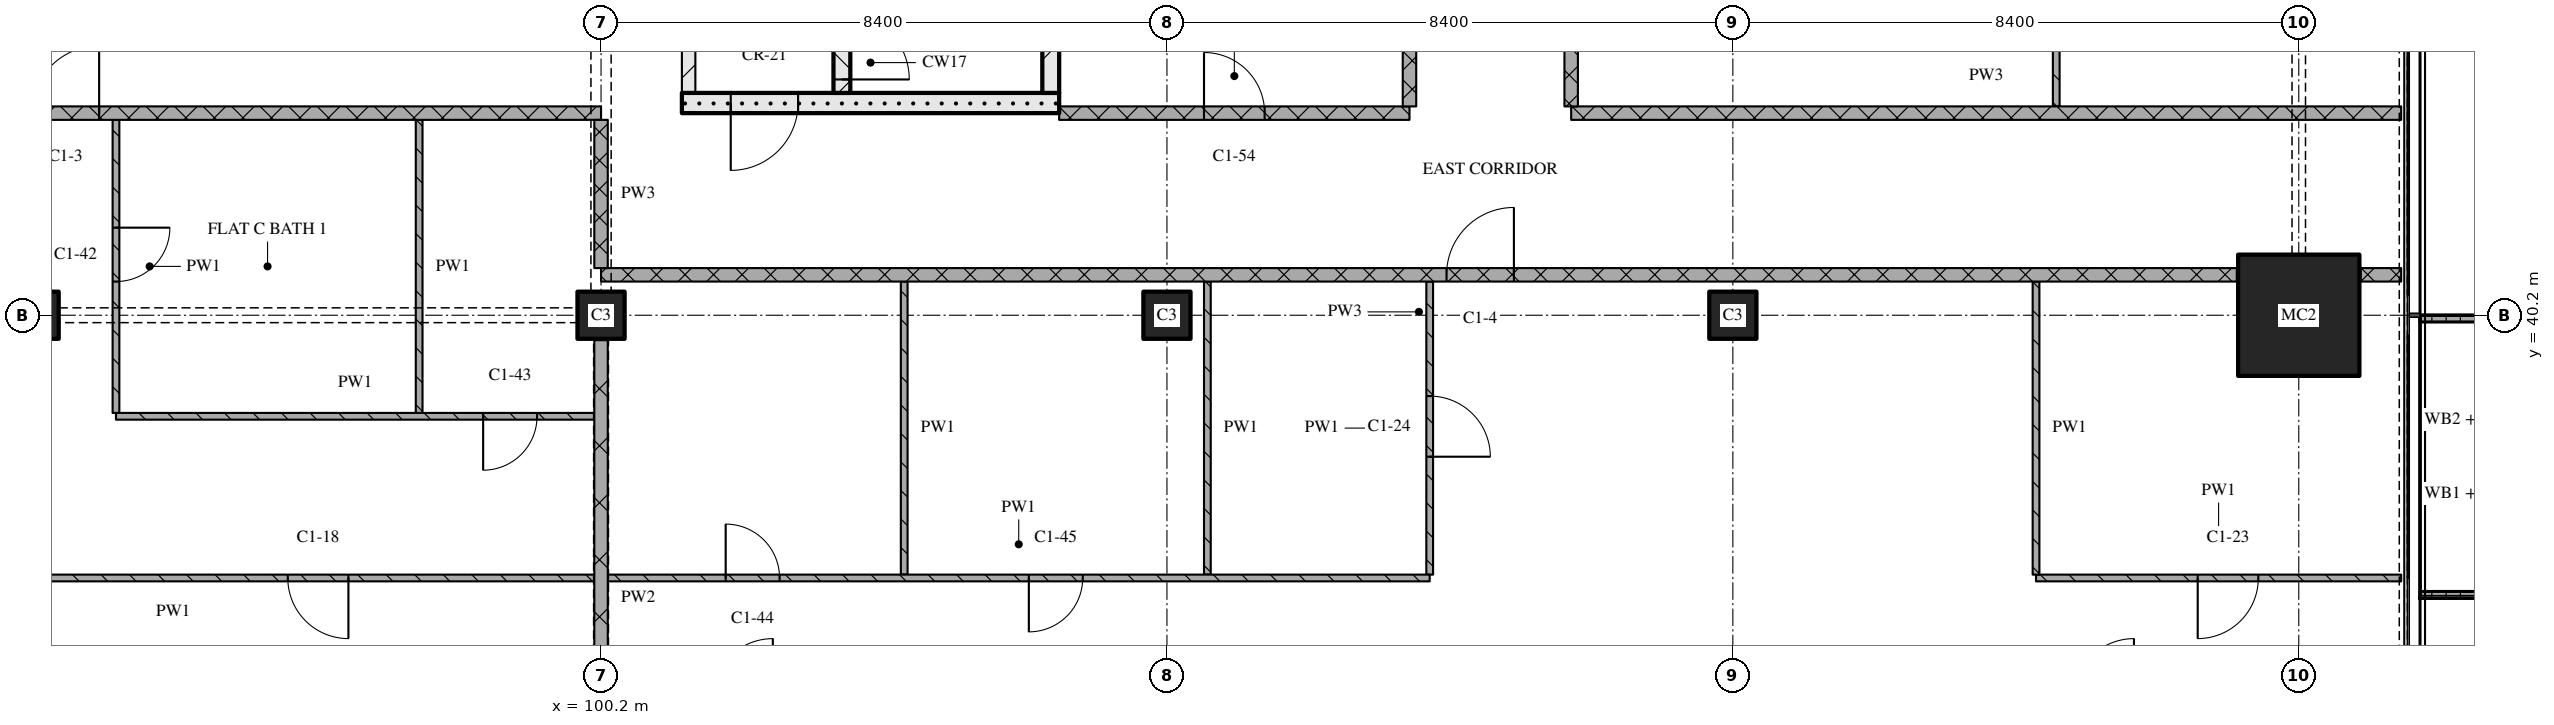
"""IFC4 building model, lengths in metres.
Left out: names, types, materials, properties, quantities, classifications, styles, units other than length and angle.
Written with IfcOpenShell. Run it as: python <this file> out.ifc"""

import sys

from ifc_helpers import new_model, si_unit, direction, frame, frame_2d, origin, origin_2d, place, context, subcontext, project, spatial, polyline, rectangle, outline, extrude, element, fill, save


model = new_model("IFC4")
c1 = context("Model", 3, precision=1e-05, world=origin(), true_north=direction((0.0, 1.0)))
c2 = subcontext(c1, "Body", "Model", "MODEL_VIEW")
j1 = project(units=[si_unit("LENGTHUNIT", "METRE"), si_unit("PLANEANGLEUNIT", "RADIAN")], contexts=[c1])
p1 = place(None, origin())
s1 = spatial("IfcSite", under=j1, at=p1, CompositionType="ELEMENT")
p2 = place(p1, origin())
s2 = spatial("IfcBuilding", under=s1, at=p2, CompositionType="ELEMENT")
p3 = place(p2, frame((0.0, 0.0, 154.65)))
s3 = spatial("IfcBuildingStorey", under=s2, at=p3, CompositionType="ELEMENT", Elevation=154.65)
for number, where, z_axis, x_axis in (
    (1, (91.8, 40.2, 0.0), (0.0, 0.0, 1.0), (1.0, 0.0, 0.0)),
    (2, (100.2, 40.2, 0.0), (0.0, 0.0, 1.0), (1.0, 0.0, 0.0)),
    (3, (108.6, 40.2, 0.0), (0.0, 0.0, 1.0), (1.0, 0.0, 0.0)),
    (4, (117.0, 40.2, 0.0), (0.0, 0.0, 1.0), (1.0, 0.0, 0.0)),
):
    element("IfcColumn", number, at=place(p3, frame(where, z_axis=z_axis, x_axis=x_axis)), inside=s3, PredefinedType="COLUMN", context=c2, shape_type="SweptSolid", body=[
        extrude(rectangle(XDim=0.7, YDim=0.7, at=origin_2d()), origin(), (0.0, 0.0, 1.0), 3.6),
    ])
p4 = place(p3, frame((125.4, 40.2, 0.0), z_axis=(0.0, 0.0, 1.0), x_axis=(1.0, 0.0, 0.0)))
e5 = element("IfcColumn", 5, at=p4, inside=s3, PredefinedType="COLUMN", context=c2, shape_type="SweptSolid", body=[
    extrude(rectangle(XDim=1.8, YDim=1.8, at=origin_2d()), origin(), (0.0, 0.0, 1.0), 3.6),
])
p5 = place(p3, origin())
e6 = element("IfcWall", 6, at=p5, inside=s3, PredefinedType="SOLIDWALL", context=c2, shape_type="SweptSolid", body=[
    extrude(outline(polyline([(127.2, 36.0), (127.2, 36.1), (128.833, 36.1), (128.833, 40.1), (127.2, 40.1), (127.2, 40.2), (128.933, 40.2), (128.933, 36.0), (127.2, 36.0)])), origin(), (0.0, 0.0, 1.0), 1.0),
])
p6 = place(p3, frame((101.4, 43.35, 0.0), z_axis=(0.0, 0.0, 1.0), x_axis=(1.0, 0.0, 0.0)))
e7 = element("IfcWall", 7, at=p6, inside=s3, PredefinedType="SOLIDWALL", context=c2, shape_type="SweptSolid", body=[
    extrude(rectangle(XDim=5.6, YDim=0.3, at=frame_2d((2.8, 0.0))), origin(), (0.0, 0.0, 1.0), 3.32),
])
p7 = place(p6, frame((0.725, 0.0, 0.0)))
e8 = element("IfcOpeningElement", 8, at=p7, cuts=e7, PredefinedType="OPENING", context=c2, shape_type="SweptSolid", body=[
    extrude(rectangle(XDim=1.0, YDim=2.1, at=frame_2d((0.5, 1.05))), frame((0.0, 0.16, 0.0), z_axis=(0.0, -1.0, 0.0), x_axis=(1.0, 0.0, 0.0)), (0.0, 0.0, 1.0), 0.32),
])
p8 = place(p3, frame((101.5, 43.5, 0.0), z_axis=(0.0, 0.0, 1.0), x_axis=(0.0, 1.0, 0.0)))
e9 = element("IfcWall", 9, at=p8, inside=s3, PredefinedType="PARTITIONING", context=c2, shape_type="SweptSolid", body=[
    extrude(rectangle(XDim=6.9, YDim=0.2, at=frame_2d((3.45, 0.0))), origin(), (0.0, 0.0, 1.0), 3.32),
])
p9 = place(p8, frame((1.0, 0.0, 0.0)))
e10 = element("IfcOpeningElement", 10, at=p9, cuts=e9, PredefinedType="OPENING", context=c2, shape_type="SweptSolid", body=[
    extrude(rectangle(XDim=1.0, YDim=2.1, at=frame_2d((0.5, 1.05))), frame((0.0, 0.11, 0.0), z_axis=(0.0, -1.0, 0.0), x_axis=(1.0, 0.0, 0.0)), (0.0, 0.0, 1.0), 0.22),
])
p10 = place(p3, frame((103.775, 43.5, 0.0), z_axis=(0.0, 0.0, 1.0), x_axis=(0.0, 1.0, 0.0)))
e11 = element("IfcWall", 11, at=p10, inside=s3, PredefinedType="SOLIDWALL", context=c2, shape_type="SweptSolid", body=[
    extrude(rectangle(XDim=6.9, YDim=0.25, at=frame_2d((3.45, 0.0))), origin(), (0.0, 0.0, 1.0), 3.32),
])
p11 = place(p10, frame((0.2, 0.0, 0.0)))
e12 = element("IfcOpeningElement", 12, at=p11, cuts=e11, PredefinedType="OPENING", context=c2, shape_type="SweptSolid", body=[
    extrude(rectangle(XDim=1.0, YDim=2.1, at=frame_2d((0.5, 1.05))), frame((0.0, 0.135, 0.0), z_axis=(0.0, -1.0, 0.0), x_axis=(1.0, 0.0, 0.0)), (0.0, 0.0, 1.0), 0.27),
])
p12 = place(p3, frame((106.875, 43.5, 0.0), z_axis=(0.0, 0.0, 1.0), x_axis=(0.0, 1.0, 0.0)))
e13 = element("IfcWall", 13, at=p12, inside=s3, PredefinedType="SOLIDWALL", context=c2, shape_type="SweptSolid", body=[
    extrude(rectangle(XDim=6.9, YDim=0.25, at=frame_2d((3.45, 0.0))), origin(), (0.0, 0.0, 1.0), 3.32),
])
p13 = place(p3, frame((121.5, 36.3, 0.0), z_axis=(0.0, 0.0, 1.0), x_axis=(1.0, 0.0, 0.0)))
e14 = element("IfcWall", 14, at=p13, inside=s3, PredefinedType="PARTITIONING", context=c2, shape_type="SweptSolid", body=[
    extrude(rectangle(XDim=5.42, YDim=0.1, at=frame_2d((2.71, 0.0))), origin(), (0.0, 0.0, 1.0), 3.32),
])
p14 = place(p13, frame((2.4, 0.0, 0.0)))
e15 = element("IfcOpeningElement", 15, at=p14, cuts=e14, PredefinedType="OPENING", context=c2, shape_type="SweptSolid", body=[
    extrude(rectangle(XDim=0.9, YDim=2.1, at=frame_2d((0.45, 1.05))), frame((0.0, 0.06, 0.0), z_axis=(0.0, -1.0, 0.0), x_axis=(1.0, 0.0, 0.0)), (0.0, 0.0, 1.0), 0.12),
])
p15 = place(p3, frame((93.0, 38.7, 0.0), z_axis=(0.0, 0.0, 1.0), x_axis=(1.0, 0.0, 0.0)))
e16 = element("IfcWall", 16, at=p15, inside=s3, PredefinedType="PARTITIONING", context=c2, shape_type="SweptSolid", body=[
    extrude(rectangle(XDim=7.1, YDim=0.1, at=frame_2d((3.55, 0.0))), origin(), (0.0, 0.0, 1.0), 3.32),
])
p16 = place(p15, frame((5.45, 0.0, 0.0)))
e17 = element("IfcOpeningElement", 17, at=p16, cuts=e16, PredefinedType="OPENING", context=c2, shape_type="SweptSolid", body=[
    extrude(rectangle(XDim=0.8, YDim=2.1, at=frame_2d((0.4, 1.05))), frame((0.0, 0.06, 0.0), z_axis=(0.0, -1.0, 0.0), x_axis=(1.0, 0.0, 0.0)), (0.0, 0.0, 1.0), 0.12),
])
p17 = place(p3, frame((124.48, 40.8, 0.0), z_axis=(0.0, 0.0, 1.0), x_axis=(-1.0, 0.0, 0.0)))
e18 = element("IfcWall", 18, at=p17, inside=s3, PredefinedType="PARTITIONING", context=c2, shape_type="SweptSolid", body=[
    extrude(rectangle(XDim=24.28, YDim=0.2, at=frame_2d((12.14, 0.0))), origin(), (0.0, 0.0, 1.0), 3.32),
])
p18 = place(p17, frame((10.73, 0.0, 0.0)))
e19 = element("IfcOpeningElement", 19, at=p18, cuts=e18, PredefinedType="OPENING", context=c2, shape_type="SweptSolid", body=[
    extrude(rectangle(XDim=1.0, YDim=2.1, at=frame_2d((0.5, 1.05))), frame((0.0, 0.11, 0.0), z_axis=(0.0, -1.0, 0.0), x_axis=(1.0, 0.0, 0.0)), (0.0, 0.0, 1.0), 0.22),
])
p19 = place(p3, frame((126.32, 40.8, 0.0), z_axis=(0.0, 0.0, 1.0), x_axis=(1.0, 0.0, 0.0)))
e20 = element("IfcWall", 20, at=p19, inside=s3, PredefinedType="PARTITIONING", context=c2, shape_type="SweptSolid", body=[
    extrude(rectangle(XDim=0.6, YDim=0.2, at=frame_2d((0.3, 0.0))), origin(), (0.0, 0.0, 1.0), 3.32),
])
p20 = place(p3, frame((100.2, 43.2, 0.0), z_axis=(0.0, 0.0, 1.0), x_axis=(-1.0, 0.0, 0.0)))
e21 = element("IfcWall", 21, at=p20, inside=s3, PredefinedType="PARTITIONING", context=c2, shape_type="SweptSolid", body=[
    extrude(rectangle(XDim=25.2, YDim=0.2, at=frame_2d((12.6, 0.0))), origin(), (0.0, 0.0, 1.0), 3.32),
])
p21 = place(p20, frame((7.45, 0.0, 0.0)))
e22 = element("IfcOpeningElement", 22, at=p21, cuts=e21, PredefinedType="OPENING", context=c2, shape_type="SweptSolid", body=[
    extrude(rectangle(XDim=1.0, YDim=2.1, at=frame_2d((0.5, 1.05))), frame((0.0, 0.11, 0.0), z_axis=(0.0, -1.0, 0.0), x_axis=(1.0, 0.0, 0.0)), (0.0, 0.0, 1.0), 0.22),
])
p22 = place(p20, frame((20.95, 0.0, 0.0)))
e23 = element("IfcOpeningElement", 23, at=p22, cuts=e21, PredefinedType="OPENING", context=c2, shape_type="SweptSolid", body=[
    extrude(rectangle(XDim=1.0, YDim=2.1, at=frame_2d((0.5, 1.05))), frame((0.0, 0.11, 0.0), z_axis=(0.0, -1.0, 0.0), x_axis=(1.0, 0.0, 0.0)), (0.0, 0.0, 1.0), 0.22),
])
p23 = place(p3, frame((107.0, 43.2, 0.0), z_axis=(0.0, 0.0, 1.0), x_axis=(1.0, 0.0, 0.0)))
e24 = element("IfcWall", 24, at=p23, inside=s3, PredefinedType="PARTITIONING", context=c2, shape_type="SweptSolid", body=[
    extrude(rectangle(XDim=5.2, YDim=0.2, at=frame_2d((2.6, 0.0))), origin(), (0.0, 0.0, 1.0), 3.32),
])
p24 = place(p23, frame((2.15, 0.0, 0.0)))
e25 = element("IfcOpeningElement", 25, at=p24, cuts=e24, PredefinedType="OPENING", context=c2, shape_type="SweptSolid", body=[
    extrude(rectangle(XDim=0.9, YDim=2.1, at=frame_2d((0.45, 1.05))), frame((0.0, 0.11, 0.0), z_axis=(0.0, -1.0, 0.0), x_axis=(1.0, 0.0, 0.0)), (0.0, 0.0, 1.0), 0.22),
])
p25 = place(p3, frame((114.6, 43.2, 0.0), z_axis=(0.0, 0.0, 1.0), x_axis=(1.0, 0.0, 0.0)))
e26 = element("IfcWall", 26, at=p25, inside=s3, PredefinedType="PARTITIONING", context=c2, shape_type="SweptSolid", body=[
    extrude(rectangle(XDim=12.32, YDim=0.2, at=frame_2d((6.16, 0.0))), origin(), (0.0, 0.0, 1.0), 3.32),
])
p26 = place(p3, frame((93.0, 43.1, 0.0), z_axis=(0.0, 0.0, 1.0), x_axis=(0.0, -1.0, 0.0)))
e27 = element("IfcWall", 27, at=p26, inside=s3, PredefinedType="PARTITIONING", context=c2, shape_type="SweptSolid", body=[
    extrude(rectangle(XDim=4.35, YDim=0.1, at=frame_2d((2.175, 0.0))), origin(), (0.0, 0.0, 1.0), 3.32),
])
p27 = place(p26, frame((1.6, 0.0, 0.0)))
e28 = element("IfcOpeningElement", 28, at=p27, cuts=e27, PredefinedType="OPENING", context=c2, shape_type="SweptSolid", body=[
    extrude(rectangle(XDim=0.8, YDim=2.1, at=frame_2d((0.4, 1.05))), frame((0.0, 0.06, 0.0), z_axis=(0.0, -1.0, 0.0), x_axis=(1.0, 0.0, 0.0)), (0.0, 0.0, 1.0), 0.12),
])
p28 = place(p3, frame((97.5, 43.1, 0.0), z_axis=(0.0, 0.0, 1.0), x_axis=(0.0, -1.0, 0.0)))
e29 = element("IfcWall", 29, at=p28, inside=s3, PredefinedType="PARTITIONING", context=c2, shape_type="SweptSolid", body=[
    extrude(rectangle(XDim=4.35, YDim=0.1, at=frame_2d((2.175, 0.0))), origin(), (0.0, 0.0, 1.0), 3.32),
])
p29 = place(p3, frame((100.2, 43.1, 0.0), z_axis=(0.0, 0.0, 1.0), x_axis=(0.0, -1.0, 0.0)))
e30 = element("IfcWall", 30, at=p29, inside=s3, PredefinedType="PARTITIONING", context=c2, shape_type="SweptSolid", body=[
    extrude(rectangle(XDim=2.2, YDim=0.2, at=frame_2d((1.1, 0.0))), origin(), (0.0, 0.0, 1.0), 2.43),
])
p30 = place(p3, frame((100.2, 39.83, 0.0), z_axis=(0.0, 0.0, 1.0), x_axis=(0.0, -1.0, 0.0)))
e31 = element("IfcWall", 31, at=p30, inside=s3, PredefinedType="PARTITIONING", context=c2, shape_type="SweptSolid", body=[
    extrude(rectangle(XDim=7.66, YDim=0.2, at=frame_2d((3.83, 0.0))), origin(), (0.0, 0.0, 1.0), 2.72),
])
for number, where, z_axis, x_axis in (
    (32, (104.7, 40.7, 0.0), (0.0, 0.0, 1.0), (0.0, -1.0, 0.0)),
    (33, (109.2, 40.7, 0.0), (0.0, 0.0, 1.0), (0.0, -1.0, 0.0)),
):
    element("IfcWall", number, at=place(p3, frame(where, z_axis=z_axis, x_axis=x_axis)), inside=s3, PredefinedType="PARTITIONING", context=c2, shape_type="SweptSolid", body=[
        extrude(rectangle(XDim=4.35, YDim=0.1, at=frame_2d((2.175, 0.0))), origin(), (0.0, 0.0, 1.0), 3.32),
    ])
p31 = place(p3, frame((112.2, 43.3, 0.0), z_axis=(0.0, 0.0, 1.0), x_axis=(0.0, 1.0, 0.0)))
e34 = element("IfcWall", 34, at=p31, inside=s3, PredefinedType="PARTITIONING", context=c2, shape_type="SweptSolid", body=[
    extrude(rectangle(XDim=15.4, YDim=0.2, at=frame_2d((7.7, 0.0))), origin(), (0.0, 0.0, 1.0), 3.32),
])
p32 = place(p31, frame((11.85, 0.0, 0.0)))
e35 = element("IfcOpeningElement", 35, at=p32, cuts=e34, PredefinedType="OPENING", context=c2, shape_type="SweptSolid", body=[
    extrude(rectangle(XDim=1.0, YDim=2.1, at=frame_2d((0.5, 1.05))), frame((0.0, 0.11, 0.0), z_axis=(0.0, -1.0, 0.0), x_axis=(1.0, 0.0, 0.0)), (0.0, 0.0, 1.0), 0.22),
])
p33 = place(p3, frame((112.5, 36.35, 0.0), z_axis=(0.0, 0.0, 1.0), x_axis=(0.0, 1.0, 0.0)))
e36 = element("IfcWall", 36, at=p33, inside=s3, PredefinedType="PARTITIONING", context=c2, shape_type="SweptSolid", body=[
    extrude(rectangle(XDim=4.35, YDim=0.1, at=frame_2d((2.175, 0.0))), origin(), (0.0, 0.0, 1.0), 3.32),
])
p34 = place(p33, frame((1.75, 0.0, 0.0)))
e37 = element("IfcOpeningElement", 37, at=p34, cuts=e36, PredefinedType="OPENING", context=c2, shape_type="SweptSolid", body=[
    extrude(rectangle(XDim=0.9, YDim=2.1, at=frame_2d((0.45, 1.05))), frame((0.0, 0.06, 0.0), z_axis=(0.0, -1.0, 0.0), x_axis=(1.0, 0.0, 0.0)), (0.0, 0.0, 1.0), 0.12),
])
p35 = place(p3, frame((114.6, 61.1, 0.0), z_axis=(0.0, 0.0, 1.0), x_axis=(0.0, -1.0, 0.0)))
e38 = element("IfcWall", 38, at=p35, inside=s3, PredefinedType="PARTITIONING", context=c2, shape_type="SweptSolid", body=[
    extrude(rectangle(XDim=17.8, YDim=0.2, at=frame_2d((8.9, 0.0))), origin(), (0.0, 0.0, 1.0), 3.32),
])
p36 = place(p35, frame((4.65, 0.0, 0.0)))
e39 = element("IfcOpeningElement", 39, at=p36, cuts=e38, PredefinedType="OPENING", context=c2, shape_type="SweptSolid", body=[
    extrude(rectangle(XDim=1.0, YDim=2.1, at=frame_2d((0.5, 1.05))), frame((0.0, 0.11, 0.0), z_axis=(0.0, -1.0, 0.0), x_axis=(1.0, 0.0, 0.0)), (0.0, 0.0, 1.0), 0.22),
])
p37 = place(p3, frame((121.5, 40.7, 0.0), z_axis=(0.0, 0.0, 1.0), x_axis=(0.0, -1.0, 0.0)))
e40 = element("IfcWall", 40, at=p37, inside=s3, PredefinedType="PARTITIONING", context=c2, shape_type="SweptSolid", body=[
    extrude(rectangle(XDim=4.35, YDim=0.1, at=frame_2d((2.175, 0.0))), origin(), (0.0, 0.0, 1.0), 3.32),
])
p38 = place(p3, frame((121.8, 48.55, 0.0), z_axis=(0.0, 0.0, 1.0), x_axis=(0.0, -1.0, 0.0)))
e41 = element("IfcWall", 41, at=p38, inside=s3, PredefinedType="PARTITIONING", context=c2, shape_type="SweptSolid", body=[
    extrude(rectangle(XDim=5.25, YDim=0.1, at=frame_2d((2.625, 0.0))), origin(), (0.0, 0.0, 1.0), 3.32),
])
p39 = place(p3, frame((100.1, 36.3, 0.0), z_axis=(0.0, 0.0, 1.0), x_axis=(-1.0, 0.0, 0.0)))
e42 = element("IfcWall", 42, at=p39, inside=s3, PredefinedType="PARTITIONING", context=c2, shape_type="SweptSolid", body=[
    extrude(rectangle(XDim=12.5, YDim=0.1, at=frame_2d((6.25, 0.0))), origin(), (0.0, 0.0, 1.0), 3.32),
])
p40 = place(p39, frame((3.65, 0.0, 0.0)))
e43 = element("IfcOpeningElement", 43, at=p40, cuts=e42, PredefinedType="OPENING", context=c2, shape_type="SweptSolid", body=[
    extrude(rectangle(XDim=0.9, YDim=2.1, at=frame_2d((0.45, 1.05))), frame((0.0, 0.06, 0.0), z_axis=(0.0, -1.0, 0.0), x_axis=(1.0, 0.0, 0.0)), (0.0, 0.0, 1.0), 0.12),
])
p41 = place(p39, frame((9.95, 0.0, 0.0)))
e44 = element("IfcOpeningElement", 44, at=p41, cuts=e42, PredefinedType="OPENING", context=c2, shape_type="SweptSolid", body=[
    extrude(rectangle(XDim=0.9, YDim=2.1, at=frame_2d((0.45, 1.05))), frame((0.0, 0.06, 0.0), z_axis=(0.0, -1.0, 0.0), x_axis=(1.0, 0.0, 0.0)), (0.0, 0.0, 1.0), 0.12),
])
p42 = place(p3, frame((100.3, 36.3, 0.0), z_axis=(0.0, 0.0, 1.0), x_axis=(1.0, 0.0, 0.0)))
e45 = element("IfcWall", 45, at=p42, inside=s3, PredefinedType="PARTITIONING", context=c2, shape_type="SweptSolid", body=[
    extrude(rectangle(XDim=12.2, YDim=0.1, at=frame_2d((6.1, 0.0))), origin(), (0.0, 0.0, 1.0), 3.32),
])
p43 = place(p42, frame((1.75, 0.0, 0.0)))
e46 = element("IfcOpeningElement", 46, at=p43, cuts=e45, PredefinedType="OPENING", context=c2, shape_type="SweptSolid", body=[
    extrude(rectangle(XDim=0.8, YDim=2.1, at=frame_2d((0.4, 1.05))), frame((0.0, 0.06, 0.0), z_axis=(0.0, -1.0, 0.0), x_axis=(1.0, 0.0, 0.0)), (0.0, 0.0, 1.0), 0.12),
])
p44 = place(p42, frame((6.25, 0.0, 0.0)))
e47 = element("IfcOpeningElement", 47, at=p44, cuts=e45, PredefinedType="OPENING", context=c2, shape_type="SweptSolid", body=[
    extrude(rectangle(XDim=0.8, YDim=2.1, at=frame_2d((0.4, 1.05))), frame((0.0, 0.06, 0.0), z_axis=(0.0, -1.0, 0.0), x_axis=(1.0, 0.0, 0.0)), (0.0, 0.0, 1.0), 0.12),
])
p45 = place(p7, origin())
e48 = element("IfcDoor", 48, at=p45, inside=s3, OperationType="SINGLE_SWING_RIGHT", PredefinedType="DOOR", context=c2, shape_type="SweptSolid", body=[
    extrude(rectangle(XDim=1.0, YDim=2.1, at=frame_2d((0.5, 1.05))), frame((0.0, 0.025, 0.0), z_axis=(0.0, -1.0, 0.0), x_axis=(1.0, 0.0, 0.0)), (0.0, 0.0, 1.0), 0.05),
])
fill(e8, e48)
p46 = place(p11, origin())
e49 = element("IfcDoor", 49, at=p46, inside=s3, OperationType="SINGLE_SWING_RIGHT", PredefinedType="DOOR", context=c2, shape_type="SweptSolid", body=[
    extrude(rectangle(XDim=1.0, YDim=2.1, at=frame_2d((0.5, 1.05))), frame((0.0, 0.025, 0.0), z_axis=(0.0, -1.0, 0.0), x_axis=(1.0, 0.0, 0.0)), (0.0, 0.0, 1.0), 0.05),
])
fill(e12, e49)
p47 = place(p14, origin())
e50 = element("IfcDoor", 50, at=p47, inside=s3, OperationType="SINGLE_SWING_RIGHT", PredefinedType="DOOR", context=c2, shape_type="SweptSolid", body=[
    extrude(rectangle(XDim=0.9, YDim=2.1, at=frame_2d((0.45, 1.05))), frame((0.0, 0.025, 0.0), z_axis=(0.0, -1.0, 0.0), x_axis=(1.0, 0.0, 0.0)), (0.0, 0.0, 1.0), 0.05),
])
fill(e15, e50)
p48 = place(p16, origin())
e51 = element("IfcDoor", 51, at=p48, inside=s3, OperationType="SINGLE_SWING_RIGHT", PredefinedType="DOOR", context=c2, shape_type="SweptSolid", body=[
    extrude(rectangle(XDim=0.8, YDim=2.1, at=frame_2d((0.4, 1.05))), frame((0.0, 0.025, 0.0), z_axis=(0.0, -1.0, 0.0), x_axis=(1.0, 0.0, 0.0)), (0.0, 0.0, 1.0), 0.05),
])
fill(e17, e51)
p49 = place(p18, origin())
e52 = element("IfcDoor", 52, at=p49, inside=s3, OperationType="SINGLE_SWING_RIGHT", PredefinedType="DOOR", context=c2, shape_type="SweptSolid", body=[
    extrude(rectangle(XDim=1.0, YDim=2.1, at=frame_2d((0.5, 1.05))), frame((0.0, 0.025, 0.0), z_axis=(0.0, -1.0, 0.0), x_axis=(1.0, 0.0, 0.0)), (0.0, 0.0, 1.0), 0.05),
])
fill(e19, e52)
p50 = place(p21, origin())
e53 = element("IfcDoor", 53, at=p50, inside=s3, OperationType="SINGLE_SWING_RIGHT", PredefinedType="DOOR", context=c2, shape_type="SweptSolid", body=[
    extrude(rectangle(XDim=1.0, YDim=2.1, at=frame_2d((0.5, 1.05))), frame((0.0, 0.025, 0.0), z_axis=(0.0, -1.0, 0.0), x_axis=(1.0, 0.0, 0.0)), (0.0, 0.0, 1.0), 0.05),
])
fill(e22, e53)
p51 = place(p24, origin())
e54 = element("IfcDoor", 54, at=p51, inside=s3, OperationType="SINGLE_SWING_LEFT", PredefinedType="DOOR", context=c2, shape_type="SweptSolid", body=[
    extrude(rectangle(XDim=0.9, YDim=2.1, at=frame_2d((0.45, 1.05))), frame((0.0, 0.025, 0.0), z_axis=(0.0, -1.0, 0.0), x_axis=(1.0, 0.0, 0.0)), (0.0, 0.0, 1.0), 0.05),
])
fill(e25, e54)
p52 = place(p27, origin())
e55 = element("IfcDoor", 55, at=p52, inside=s3, OperationType="SINGLE_SWING_LEFT", PredefinedType="DOOR", context=c2, shape_type="SweptSolid", body=[
    extrude(rectangle(XDim=0.8, YDim=2.1, at=frame_2d((0.4, 1.05))), frame((0.0, 0.025, 0.0), z_axis=(0.0, -1.0, 0.0), x_axis=(1.0, 0.0, 0.0)), (0.0, 0.0, 1.0), 0.05),
])
fill(e28, e55)
p53 = place(p34, origin())
e56 = element("IfcDoor", 56, at=p53, inside=s3, OperationType="SINGLE_SWING_RIGHT", PredefinedType="DOOR", context=c2, shape_type="SweptSolid", body=[
    extrude(rectangle(XDim=0.9, YDim=2.1, at=frame_2d((0.45, 1.05))), frame((0.0, 0.025, 0.0), z_axis=(0.0, -1.0, 0.0), x_axis=(1.0, 0.0, 0.0)), (0.0, 0.0, 1.0), 0.05),
])
fill(e37, e56)
p54 = place(p40, origin())
e57 = element("IfcDoor", 57, at=p54, inside=s3, OperationType="SINGLE_SWING_LEFT", PredefinedType="DOOR", context=c2, shape_type="SweptSolid", body=[
    extrude(rectangle(XDim=0.9, YDim=2.1, at=frame_2d((0.45, 1.05))), frame((0.0, 0.025, 0.0), z_axis=(0.0, -1.0, 0.0), x_axis=(1.0, 0.0, 0.0)), (0.0, 0.0, 1.0), 0.05),
])
fill(e43, e57)
p55 = place(p43, origin())
e58 = element("IfcDoor", 58, at=p55, inside=s3, OperationType="SINGLE_SWING_LEFT", PredefinedType="DOOR", context=c2, shape_type="SweptSolid", body=[
    extrude(rectangle(XDim=0.8, YDim=2.1, at=frame_2d((0.4, 1.05))), frame((0.0, 0.025, 0.0), z_axis=(0.0, -1.0, 0.0), x_axis=(1.0, 0.0, 0.0)), (0.0, 0.0, 1.0), 0.05),
])
fill(e46, e58)
p56 = place(p44, origin())
e59 = element("IfcDoor", 59, at=p56, inside=s3, OperationType="SINGLE_SWING_RIGHT", PredefinedType="DOOR", context=c2, shape_type="SweptSolid", body=[
    extrude(rectangle(XDim=0.8, YDim=2.1, at=frame_2d((0.4, 1.05))), frame((0.0, 0.025, 0.0), z_axis=(0.0, -1.0, 0.0), x_axis=(1.0, 0.0, 0.0)), (0.0, 0.0, 1.0), 0.05),
])
fill(e47, e59)
save(model, sys.argv[1])
